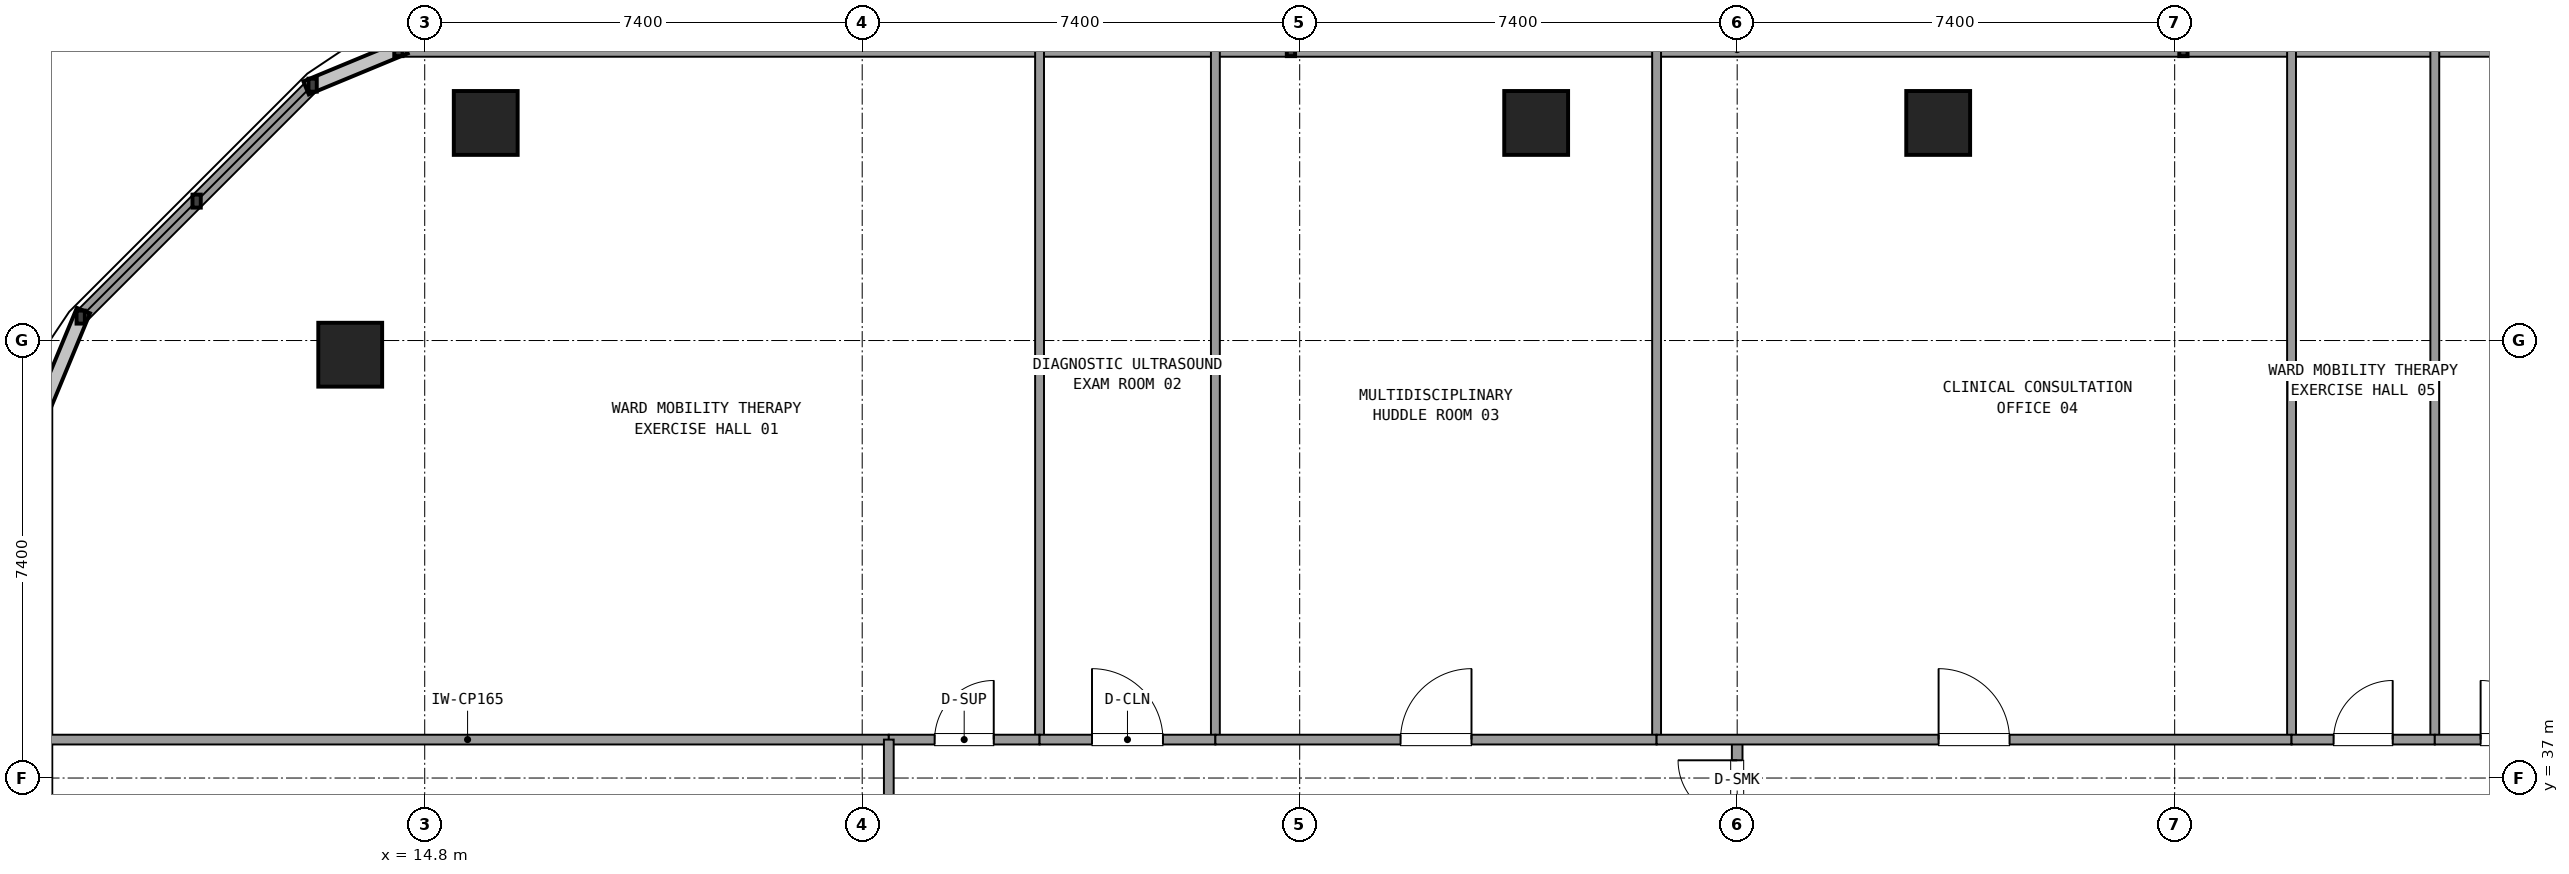
"""IFC4 building model, lengths in metres.
Left out: names, types, materials, properties, quantities, classifications, styles, units other than length and angle.
Written with IfcOpenShell. Run it as: python <this file> out.ifc"""

import sys

from ifc_helpers import new_model, si_unit, direction, frame, frame_2d, origin, origin_2d, place, context, subcontext, project, spatial, rectangle, extrude, element, fill, save


model = new_model("IFC4")
c1 = context("Model", 3, precision=1e-05, world=origin(), true_north=direction((0.0, 1.0)))
c2 = subcontext(c1, "Body", "Model", "MODEL_VIEW")
j1 = project(units=[si_unit("LENGTHUNIT", "METRE"), si_unit("PLANEANGLEUNIT", "RADIAN")], contexts=[c1])
p1 = place(None, origin())
s1 = spatial("IfcSite", under=j1, at=p1, CompositionType="ELEMENT")
p2 = place(p1, origin())
s2 = spatial("IfcBuilding", under=s1, at=p2, CompositionType="ELEMENT")
p3 = place(p2, frame((0.0, 0.0, 34.74)))
s3 = spatial("IfcBuildingStorey", under=s2, at=p3, CompositionType="ELEMENT", Elevation=34.74)
for number, where, z_axis, x_axis in (
    (1, (40.4, 48.08, 0.0), (0.0, 0.0, 1.0), (1.0, 0.0, 0.0)),
    (2, (33.6, 48.08, 0.0), (0.0, 0.0, 1.0), (1.0, 0.0, 0.0)),
    (3, (15.832, 48.08, 0.0), (0.0, 0.0, 1.0), (1.0, 0.0, 0.0)),
    (4, (13.54, 44.16, 0.0), (0.0, 0.0, 1.0), (1.0, 0.0, 0.0)),
):
    element("IfcColumn", number, at=place(p3, frame(where, z_axis=z_axis, x_axis=x_axis)), inside=s3, PredefinedType="COLUMN", context=c2, shape_type="SweptSolid", body=[
        extrude(rectangle(XDim=1.08, YDim=1.08, at=origin_2d()), origin(), (0.0, 0.0, 1.0), 3.6),
    ])
p4 = place(p3, frame((59.645, 49.32, 0.0), z_axis=(0.0, 0.0, 1.0), x_axis=(-1.0, 0.0, 0.0)))
e5 = element("IfcWall", 5, at=p4, inside=s3, PredefinedType="SOLIDWALL", context=c2, shape_type="SweptSolid", body=[
    extrude(rectangle(XDim=45.29, YDim=0.24, at=frame_2d((22.645, 0.0))), origin(), (0.0, 0.0, 1.0), 0.85),
])
p5 = place(p3, frame((12.904, 48.719, 0.0), z_axis=(0.0, 0.0, 1.0), x_axis=(-0.707106781187, -0.707106781187, 0.0)))
e6 = element("IfcWall", 6, at=p5, inside=s3, PredefinedType="SOLIDWALL", context=c2, shape_type="SweptSolid", body=[
    extrude(rectangle(XDim=5.548, YDim=0.24, at=frame_2d((2.774, 0.0))), origin(), (0.0, 0.0, 1.0), 0.85),
])
p6 = place(p3, frame((37.0, 34.95, 0.0), z_axis=(0.0, 0.0, 1.0), x_axis=(0.0, 1.0, 0.0)))
e7 = element("IfcWall", 7, at=p6, inside=s3, PredefinedType="PARTITIONING", context=c2, shape_type="SweptSolid", body=[
    extrude(rectangle(XDim=2.7, YDim=0.18, at=frame_2d((1.35, 0.0))), origin(), (0.0, 0.0, 1.0), 2.61),
])
p7 = place(p6, frame((0.35, 0.0, 0.0)))
e8 = element("IfcOpeningElement", 8, at=p7, cuts=e7, PredefinedType="OPENING", context=c2, shape_type="SweptSolid", body=[
    extrude(rectangle(XDim=2.0, YDim=2.2, at=frame_2d((1.0, 1.1))), frame((0.0, 0.1, 0.0), z_axis=(0.0, -1.0, 0.0), x_axis=(1.0, 0.0, 0.0)), (0.0, 0.0, 1.0), 0.2),
])
p8 = place(p3, frame((8.4, 37.65, 0.0), z_axis=(0.0, 0.0, 1.0), x_axis=(1.0, 0.0, 0.0)))
e9 = element("IfcWall", 9, at=p8, inside=s3, PredefinedType="PARTITIONING", context=c2, shape_type="SweptSolid", body=[
    extrude(rectangle(XDim=14.25, YDim=0.165, at=frame_2d((7.125, 0.0))), origin(), (0.0, 0.0, 1.0), 2.61),
])
p9 = place(p3, frame((25.2, 37.65, 0.0), z_axis=(0.0, 0.0, 1.0), x_axis=(0.0, 1.0, 0.0)))
e10 = element("IfcWall", 10, at=p9, inside=s3, PredefinedType="PARTITIONING", context=c2, shape_type="SweptSolid", body=[
    extrude(rectangle(XDim=11.65, YDim=0.15, at=frame_2d((5.825, 0.0))), origin(), (0.0, 0.0, 1.0), 2.61),
])
p10 = place(p3, frame((22.65, 37.65, 0.0), z_axis=(0.0, 0.0, 1.0), x_axis=(1.0, 0.0, 0.0)))
e11 = element("IfcWall", 11, at=p10, inside=s3, PredefinedType="PARTITIONING", context=c2, shape_type="SweptSolid", body=[
    extrude(rectangle(XDim=2.55, YDim=0.165, at=frame_2d((1.275, 0.0))), origin(), (0.0, 0.0, 1.0), 2.61),
])
p11 = place(p10, frame((0.775, 0.0, 0.0)))
e12 = element("IfcOpeningElement", 12, at=p11, cuts=e11, PredefinedType="OPENING", context=c2, shape_type="SweptSolid", body=[
    extrude(rectangle(XDim=1.0, YDim=2.15, at=frame_2d((0.5, 1.075))), frame((0.0, 0.093, 0.0), z_axis=(0.0, -1.0, 0.0), x_axis=(1.0, 0.0, 0.0)), (0.0, 0.0, 1.0), 0.185),
])
p12 = place(p3, frame((28.174, 37.65, 0.0), z_axis=(0.0, 0.0, 1.0), x_axis=(0.0, 1.0, 0.0)))
e13 = element("IfcWall", 13, at=p12, inside=s3, PredefinedType="PARTITIONING", context=c2, shape_type="SweptSolid", body=[
    extrude(rectangle(XDim=11.65, YDim=0.15, at=frame_2d((5.825, 0.0))), origin(), (0.0, 0.0, 1.0), 2.61),
])
p13 = place(p3, frame((25.2, 37.65, 0.0), z_axis=(0.0, 0.0, 1.0), x_axis=(1.0, 0.0, 0.0)))
e14 = element("IfcWall", 14, at=p13, inside=s3, PredefinedType="PARTITIONING", context=c2, shape_type="SweptSolid", body=[
    extrude(rectangle(XDim=2.974, YDim=0.165, at=frame_2d((1.487, 0.0))), origin(), (0.0, 0.0, 1.0), 2.61),
])
p14 = place(p13, frame((0.887, 0.0, 0.0)))
e15 = element("IfcOpeningElement", 15, at=p14, cuts=e14, PredefinedType="OPENING", context=c2, shape_type="SweptSolid", body=[
    extrude(rectangle(XDim=1.2, YDim=2.15, at=frame_2d((0.6, 1.075))), frame((0.0, 0.093, 0.0), z_axis=(0.0, -1.0, 0.0), x_axis=(1.0, 0.0, 0.0)), (0.0, 0.0, 1.0), 0.185),
])
p15 = place(p3, frame((35.637, 37.65, 0.0), z_axis=(0.0, 0.0, 1.0), x_axis=(0.0, 1.0, 0.0)))
e16 = element("IfcWall", 16, at=p15, inside=s3, PredefinedType="PARTITIONING", context=c2, shape_type="SweptSolid", body=[
    extrude(rectangle(XDim=11.65, YDim=0.15, at=frame_2d((5.825, 0.0))), origin(), (0.0, 0.0, 1.0), 2.61),
])
p16 = place(p3, frame((28.174, 37.65, 0.0), z_axis=(0.0, 0.0, 1.0), x_axis=(1.0, 0.0, 0.0)))
e17 = element("IfcWall", 17, at=p16, inside=s3, PredefinedType="PARTITIONING", context=c2, shape_type="SweptSolid", body=[
    extrude(rectangle(XDim=7.463, YDim=0.165, at=frame_2d((3.731, 0.0))), origin(), (0.0, 0.0, 1.0), 2.61),
])
p17 = place(p16, frame((3.132, 0.0, 0.0)))
e18 = element("IfcOpeningElement", 18, at=p17, cuts=e17, PredefinedType="OPENING", context=c2, shape_type="SweptSolid", body=[
    extrude(rectangle(XDim=1.2, YDim=2.15, at=frame_2d((0.6, 1.075))), frame((0.0, 0.093, 0.0), z_axis=(0.0, -1.0, 0.0), x_axis=(1.0, 0.0, 0.0)), (0.0, 0.0, 1.0), 0.185),
])
p18 = place(p3, frame((46.377, 37.65, 0.0), z_axis=(0.0, 0.0, 1.0), x_axis=(0.0, 1.0, 0.0)))
e19 = element("IfcWall", 19, at=p18, inside=s3, PredefinedType="PARTITIONING", context=c2, shape_type="SweptSolid", body=[
    extrude(rectangle(XDim=11.65, YDim=0.15, at=frame_2d((5.825, 0.0))), origin(), (0.0, 0.0, 1.0), 2.61),
])
p19 = place(p3, frame((35.637, 37.65, 0.0), z_axis=(0.0, 0.0, 1.0), x_axis=(1.0, 0.0, 0.0)))
e20 = element("IfcWall", 20, at=p19, inside=s3, PredefinedType="PARTITIONING", context=c2, shape_type="SweptSolid", body=[
    extrude(rectangle(XDim=10.74, YDim=0.165, at=frame_2d((5.37, 0.0))), origin(), (0.0, 0.0, 1.0), 2.61),
])
p20 = place(p19, frame((4.77, 0.0, 0.0)))
e21 = element("IfcOpeningElement", 21, at=p20, cuts=e20, PredefinedType="OPENING", context=c2, shape_type="SweptSolid", body=[
    extrude(rectangle(XDim=1.2, YDim=2.15, at=frame_2d((0.6, 1.075))), frame((0.0, 0.093, 0.0), z_axis=(0.0, -1.0, 0.0), x_axis=(1.0, 0.0, 0.0)), (0.0, 0.0, 1.0), 0.185),
])
p21 = place(p3, frame((48.8, 37.65, 0.0), z_axis=(0.0, 0.0, 1.0), x_axis=(0.0, 1.0, 0.0)))
e22 = element("IfcWall", 22, at=p21, inside=s3, PredefinedType="PARTITIONING", context=c2, shape_type="SweptSolid", body=[
    extrude(rectangle(XDim=11.65, YDim=0.15, at=frame_2d((5.825, 0.0))), origin(), (0.0, 0.0, 1.0), 2.61),
])
p22 = place(p3, frame((46.377, 37.65, 0.0), z_axis=(0.0, 0.0, 1.0), x_axis=(1.0, 0.0, 0.0)))
e23 = element("IfcWall", 23, at=p22, inside=s3, PredefinedType="PARTITIONING", context=c2, shape_type="SweptSolid", body=[
    extrude(rectangle(XDim=2.423, YDim=0.165, at=frame_2d((1.211, 0.0))), origin(), (0.0, 0.0, 1.0), 2.61),
])
p23 = place(p22, frame((0.711, 0.0, 0.0)))
e24 = element("IfcOpeningElement", 24, at=p23, cuts=e23, PredefinedType="OPENING", context=c2, shape_type="SweptSolid", body=[
    extrude(rectangle(XDim=1.0, YDim=2.15, at=frame_2d((0.5, 1.075))), frame((0.0, 0.093, 0.0), z_axis=(0.0, -1.0, 0.0), x_axis=(1.0, 0.0, 0.0)), (0.0, 0.0, 1.0), 0.185),
])
p24 = place(p3, frame((48.8, 37.65, 0.0), z_axis=(0.0, 0.0, 1.0), x_axis=(1.0, 0.0, 0.0)))
e25 = element("IfcWall", 25, at=p24, inside=s3, PredefinedType="PARTITIONING", context=c2, shape_type="SweptSolid", body=[
    extrude(rectangle(XDim=2.55, YDim=0.165, at=frame_2d((1.275, 0.0))), origin(), (0.0, 0.0, 1.0), 2.61),
])
p25 = place(p24, frame((0.775, 0.0, 0.0)))
e26 = element("IfcOpeningElement", 26, at=p25, cuts=e25, PredefinedType="OPENING", context=c2, shape_type="SweptSolid", body=[
    extrude(rectangle(XDim=1.0, YDim=2.15, at=frame_2d((0.5, 1.075))), frame((0.0, 0.093, 0.0), z_axis=(0.0, -1.0, 0.0), x_axis=(1.0, 0.0, 0.0)), (0.0, 0.0, 1.0), 0.185),
])
p26 = place(p3, frame((22.65, 32.254, 0.0), z_axis=(0.0, 0.0, 1.0), x_axis=(0.0, 1.0, 0.0)))
e27 = element("IfcWall", 27, at=p26, inside=s3, PredefinedType="PARTITIONING", context=c2, shape_type="SweptSolid", body=[
    extrude(rectangle(XDim=5.396, YDim=0.165, at=frame_2d((2.698, 0.0))), origin(), (0.0, 0.0, 1.0), 2.61),
])
p27 = place(p26, frame((2.098, 0.0, 0.0)))
e28 = element("IfcOpeningElement", 28, at=p27, cuts=e27, PredefinedType="OPENING", context=c2, shape_type="SweptSolid", body=[
    extrude(rectangle(XDim=1.2, YDim=2.15, at=frame_2d((0.6, 1.075))), frame((0.0, 0.093, 0.0), z_axis=(0.0, -1.0, 0.0), x_axis=(1.0, 0.0, 0.0)), (0.0, 0.0, 1.0), 0.185),
])
p28 = place(p7, origin())
e29 = element("IfcDoor", 29, at=p28, inside=s3, OperationType="DOUBLE_DOOR_SINGLE_SWING", PredefinedType="DOOR", context=c2, shape_type="SweptSolid", body=[
    extrude(rectangle(XDim=2.0, YDim=2.2, at=frame_2d((1.0, 1.1))), frame((0.0, 0.025, 0.0), z_axis=(0.0, -1.0, 0.0), x_axis=(1.0, 0.0, 0.0)), (0.0, 0.0, 1.0), 0.05),
])
fill(e8, e29)
p29 = place(p11, origin())
e30 = element("IfcDoor", 30, at=p29, inside=s3, OperationType="SINGLE_SWING_RIGHT", PredefinedType="DOOR", context=c2, shape_type="SweptSolid", body=[
    extrude(rectangle(XDim=1.0, YDim=2.15, at=frame_2d((0.5, 1.075))), frame((0.0, 0.025, 0.0), z_axis=(0.0, -1.0, 0.0), x_axis=(1.0, 0.0, 0.0)), (0.0, 0.0, 1.0), 0.05),
])
fill(e12, e30)
p30 = place(p14, origin())
e31 = element("IfcDoor", 31, at=p30, inside=s3, OperationType="SINGLE_SWING_LEFT", PredefinedType="DOOR", context=c2, shape_type="SweptSolid", body=[
    extrude(rectangle(XDim=1.2, YDim=2.15, at=frame_2d((0.6, 1.075))), frame((0.0, 0.025, 0.0), z_axis=(0.0, -1.0, 0.0), x_axis=(1.0, 0.0, 0.0)), (0.0, 0.0, 1.0), 0.05),
])
fill(e15, e31)
p31 = place(p17, origin())
e32 = element("IfcDoor", 32, at=p31, inside=s3, OperationType="SINGLE_SWING_RIGHT", PredefinedType="DOOR", context=c2, shape_type="SweptSolid", body=[
    extrude(rectangle(XDim=1.2, YDim=2.15, at=frame_2d((0.6, 1.075))), frame((0.0, 0.025, 0.0), z_axis=(0.0, -1.0, 0.0), x_axis=(1.0, 0.0, 0.0)), (0.0, 0.0, 1.0), 0.05),
])
fill(e18, e32)
p32 = place(p20, origin())
e33 = element("IfcDoor", 33, at=p32, inside=s3, OperationType="SINGLE_SWING_LEFT", PredefinedType="DOOR", context=c2, shape_type="SweptSolid", body=[
    extrude(rectangle(XDim=1.2, YDim=2.15, at=frame_2d((0.6, 1.075))), frame((0.0, 0.025, 0.0), z_axis=(0.0, -1.0, 0.0), x_axis=(1.0, 0.0, 0.0)), (0.0, 0.0, 1.0), 0.05),
])
fill(e21, e33)
p33 = place(p23, origin())
e34 = element("IfcDoor", 34, at=p33, inside=s3, OperationType="SINGLE_SWING_RIGHT", PredefinedType="DOOR", context=c2, shape_type="SweptSolid", body=[
    extrude(rectangle(XDim=1.0, YDim=2.15, at=frame_2d((0.5, 1.075))), frame((0.0, 0.025, 0.0), z_axis=(0.0, -1.0, 0.0), x_axis=(1.0, 0.0, 0.0)), (0.0, 0.0, 1.0), 0.05),
])
fill(e24, e34)
p34 = place(p25, origin())
e35 = element("IfcDoor", 35, at=p34, inside=s3, OperationType="SINGLE_SWING_LEFT", PredefinedType="DOOR", context=c2, shape_type="SweptSolid", body=[
    extrude(rectangle(XDim=1.0, YDim=2.15, at=frame_2d((0.5, 1.075))), frame((0.0, 0.025, 0.0), z_axis=(0.0, -1.0, 0.0), x_axis=(1.0, 0.0, 0.0)), (0.0, 0.0, 1.0), 0.05),
])
fill(e26, e35)
save(model, sys.argv[1])
